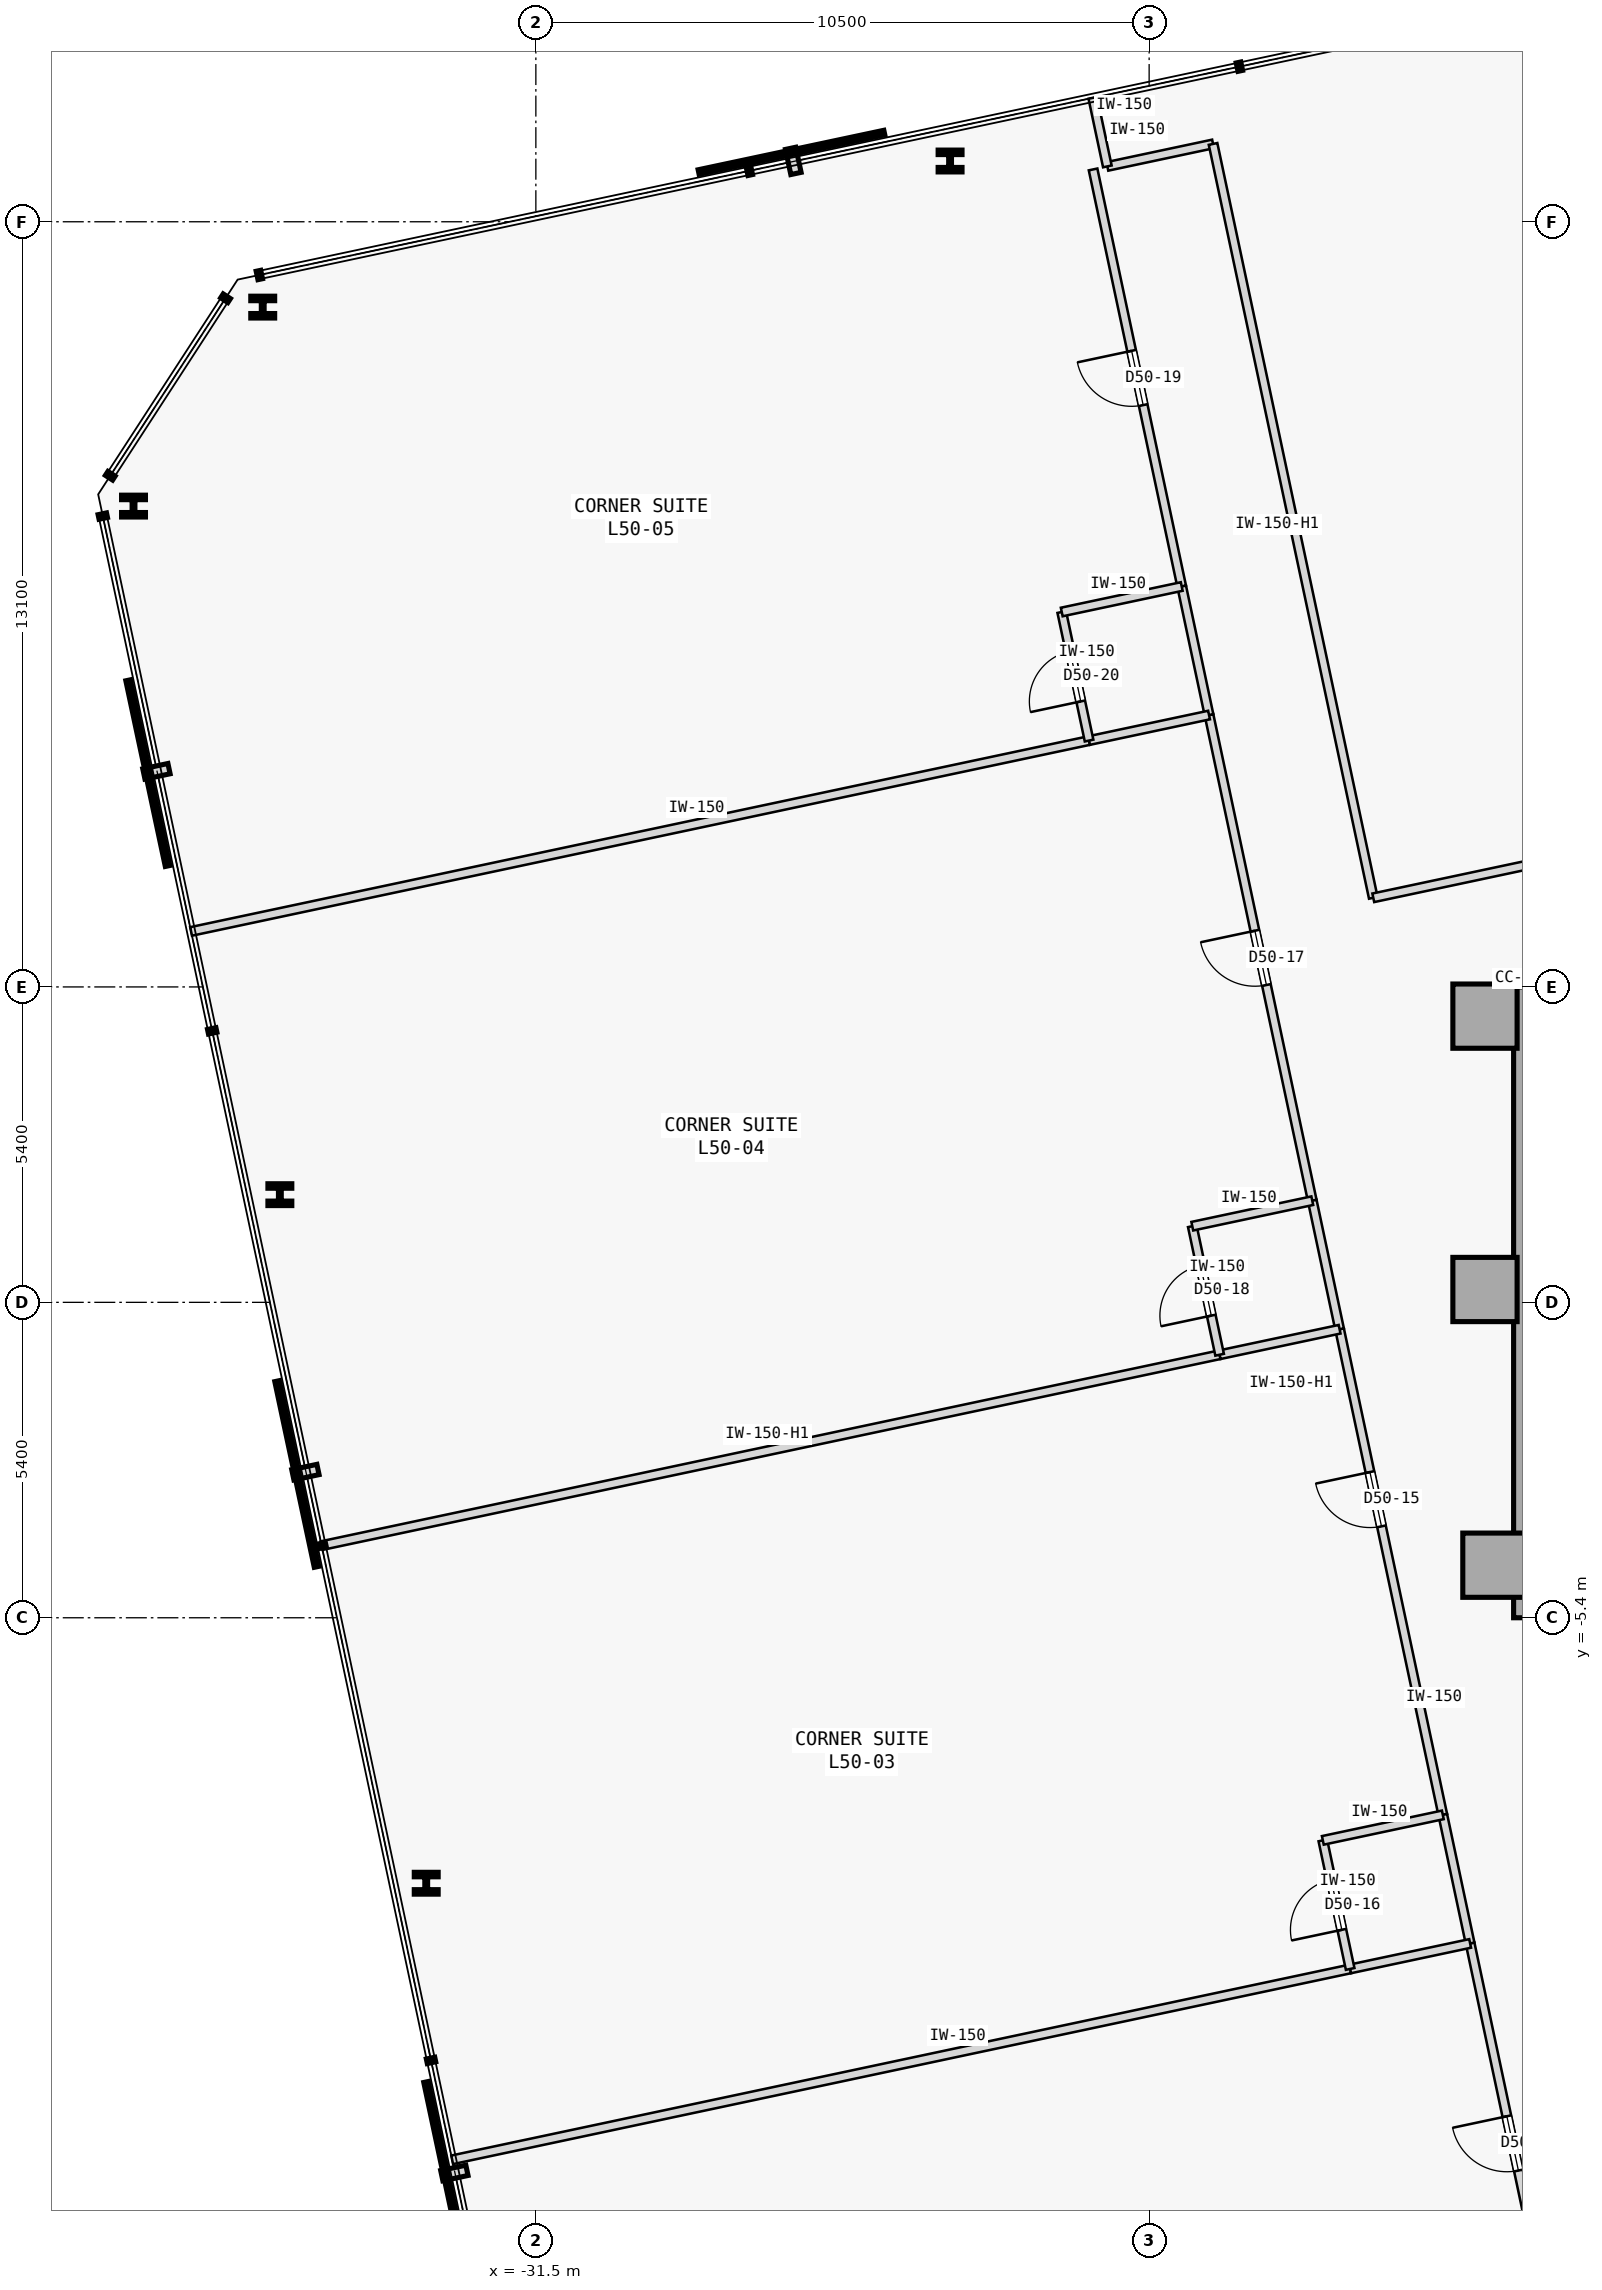
"""IFC4 building model, lengths in metres.
Left out: names, types, materials, properties, quantities, classifications, styles, units other than length and angle.
Written with IfcOpenShell. Run it as: python <this file> out.ifc"""

import sys

from ifc_helpers import new_model, si_unit, direction, frame, frame_2d, origin, origin_2d, place, context, subcontext, project, spatial, rectangle, i_section, extrude, element, fill, save


model = new_model("IFC4")
c1 = context("Model", 3, precision=1e-05, world=origin(), true_north=direction((0.0, 1.0)))
c2 = subcontext(c1, "Body", "Model", "MODEL_VIEW")
j1 = project(units=[si_unit("LENGTHUNIT", "METRE"), si_unit("PLANEANGLEUNIT", "RADIAN")], contexts=[c1])
p1 = place(None, origin())
s1 = spatial("IfcSite", under=j1, at=p1, CompositionType="ELEMENT")
p2 = place(p1, origin())
s2 = spatial("IfcBuilding", under=s1, at=p2, CompositionType="ELEMENT")
p3 = place(p2, frame((0.0, 0.0, 192.2)))
s3 = spatial("IfcBuildingStorey", under=s2, at=p3, CompositionType="ELEMENT", Elevation=192.2)
for number, where, z_axis, x_axis in (
    (1, (-15.25, 4.9, 0.0), (0.0, 0.0, 1.0), (1.0, 0.0, 0.0)),
    (2, (-15.25, 0.22, 0.0), (0.0, 0.0, 1.0), (1.0, 0.0, 0.0)),
    (3, (-15.08, -4.5, 0.0), (0.0, 0.0, 1.0), (1.0, 0.0, 0.0)),
):
    element("IfcColumn", number, at=place(p3, frame(where, z_axis=z_axis, x_axis=x_axis)), inside=s3, PredefinedType="COLUMN", context=c2, shape_type="SweptSolid", body=[
        extrude(rectangle(XDim=1.1, YDim=1.1, at=origin_2d()), origin(), (0.0, 0.0, 1.0), 3.4),
    ])
p4 = place(p3, frame((-14.56, -5.4, 0.0), z_axis=(0.0, 0.0, 1.0), x_axis=(0.0, 1.0, 0.0)))
e4 = element("IfcWall", 4, at=p4, inside=s3, PredefinedType="SHEAR", context=c2, shape_type="SweptSolid", body=[
    extrude(rectangle(XDim=10.8, YDim=0.4, at=frame_2d((5.4, 0.0))), origin(), (0.0, 0.0, 1.0), 3.175),
])
for number, where, z_axis, x_axis in (
    (5, (-24.408, 19.54, 0.0), (0.0, 0.0, 1.0), (1.0, 0.0, 0.0)),
    (6, (-36.176, 17.039, 0.0), (0.0, 0.0, 1.0), (1.0, 0.0, 0.0)),
    (7, (-38.389, 13.632, 0.0), (0.0, 0.0, 1.0), (1.0, 0.0, 0.0)),
    (8, (-35.883, 1.844, 0.0), (0.0, 0.0, 1.0), (1.0, 0.0, 0.0)),
    (9, (-33.377, -9.945, 0.0), (0.0, 0.0, 1.0), (1.0, 0.0, 0.0)),
):
    element("IfcColumn", number, at=place(p3, frame(where, z_axis=z_axis, x_axis=x_axis)), inside=s3, PredefinedType="COLUMN", context=c2, shape_type="SweptSolid", body=[
        extrude(i_section(OverallWidth=0.409, OverallDepth=0.374, WebThickness=0.048, FlangeThickness=0.077, FilletRadius=0.015, at=origin_2d()), origin(), (0.0, 0.0, 1.0), 3.4),
    ])
p5 = place(p3, frame((-21.715, 19.448, 0.0), z_axis=(0.0, 0.0, 1.0), x_axis=(0.978160192495, 0.207852442415, 0.0)))
e10 = element("IfcWall", 10, at=p5, inside=s3, PredefinedType="PARTITIONING", context=c2, shape_type="SweptSolid", body=[
    extrude(rectangle(XDim=1.85, YDim=0.15, at=frame_2d((0.925, 0.0))), origin(), (0.0, 0.0, 1.0), 3.175),
])
p6 = place(p3, frame((-17.162, 6.926, 0.0), z_axis=(0.0, 0.0, 1.0), x_axis=(-0.207911421929, 0.978147657888, 0.0)))
e11 = element("IfcWall", 11, at=p6, inside=s3, PredefinedType="PARTITIONING", context=c2, shape_type="SweptSolid", body=[
    extrude(rectangle(XDim=13.195, YDim=0.15, at=frame_2d((6.598, 0.0))), origin(), (0.0, 0.0, 1.0), 2.725),
])
p7 = place(p3, frame((-17.162, 6.926, 0.0), z_axis=(0.0, 0.0, 1.0), x_axis=(0.978145870853, 0.207919829103, 0.0)))
e12 = element("IfcWall", 12, at=p7, inside=s3, PredefinedType="PARTITIONING", context=c2, shape_type="SweptSolid", body=[
    extrude(rectangle(XDim=15.347, YDim=0.15, at=frame_2d((7.673, 0.0))), origin(), (0.0, 0.0, 1.0), 3.175),
])
p8 = place(p7, frame((7.213, 0.0, 0.0)))
e13 = element("IfcOpeningElement", 13, at=p8, cuts=e12, PredefinedType="OPENING", context=c2, shape_type="SweptSolid", body=[
    extrude(rectangle(XDim=0.92, YDim=2.15, at=frame_2d((0.46, 1.075))), frame((0.0, 0.085, 0.0), z_axis=(0.0, -1.0, 0.0), x_axis=(1.0, 0.0, 0.0)), (0.0, 0.0, 1.0), 0.17),
])
p9 = place(p3, frame((-14.049, -17.823, 0.0), z_axis=(0.0, 0.0, 1.0), x_axis=(-0.207940096132, 0.978141562567, 0.0)))
e14 = element("IfcWall", 14, at=p9, inside=s3, PredefinedType="PARTITIONING", context=c2, shape_type="SweptSolid", body=[
    extrude(rectangle(XDim=7.0, YDim=0.15, at=frame_2d((3.5, 0.0))), origin(), (0.0, 0.0, 1.0), 3.175),
])
p10 = place(p9, frame((3.025, 0.0, 0.0)))
e15 = element("IfcOpeningElement", 15, at=p10, cuts=e14, PredefinedType="OPENING", context=c2, shape_type="SweptSolid", body=[
    extrude(rectangle(XDim=0.95, YDim=2.15, at=frame_2d((0.475, 1.075))), frame((0.0, 0.085, 0.0), z_axis=(0.0, -1.0, 0.0), x_axis=(1.0, 0.0, 0.0)), (0.0, 0.0, 1.0), 0.17),
])
p11 = place(p3, frame((-15.972, -8.775, 0.0), z_axis=(0.0, 0.0, 1.0), x_axis=(-0.207894825434, 0.97815118543, 0.0)))
e16 = element("IfcWall", 16, at=p11, inside=s3, PredefinedType="PARTITIONING", context=c2, shape_type="SweptSolid", body=[
    extrude(rectangle(XDim=8.5, YDim=0.15, at=frame_2d((4.25, 0.0))), origin(), (0.0, 0.0, 1.0), 3.175),
])
p12 = place(p11, frame((5.05, 0.0, 0.0)))
e17 = element("IfcOpeningElement", 17, at=p12, cuts=e16, PredefinedType="OPENING", context=c2, shape_type="SweptSolid", body=[
    extrude(rectangle(XDim=0.95, YDim=2.15, at=frame_2d((0.475, 1.075))), frame((0.0, 0.085, 0.0), z_axis=(0.0, -1.0, 0.0), x_axis=(1.0, 0.0, 0.0)), (0.0, 0.0, 1.0), 0.17),
])
p13 = place(p3, frame((-15.504, -10.976, 0.0), z_axis=(0.0, 0.0, 1.0), x_axis=(-0.207891197838, 0.978151956427, 0.0)))
e18 = element("IfcWall", 18, at=p13, inside=s3, PredefinedType="PARTITIONING", context=c2, shape_type="SweptSolid", body=[
    extrude(rectangle(XDim=2.25, YDim=0.15, at=frame_2d((1.125, 0.0))), origin(), (0.0, 0.0, 1.0), 3.175),
])
p14 = place(p3, frame((-18.207, 1.74, 0.0), z_axis=(0.0, 0.0, 1.0), x_axis=(-0.207922306475, 0.978145344246, 0.0)))
e19 = element("IfcWall", 19, at=p14, inside=s3, PredefinedType="PARTITIONING", context=c2, shape_type="SweptSolid", body=[
    extrude(rectangle(XDim=8.5, YDim=0.15, at=frame_2d((4.25, 0.0))), origin(), (0.0, 0.0, 1.0), 3.175),
])
p15 = place(p14, frame((3.775, 0.0, 0.0)))
e20 = element("IfcOpeningElement", 20, at=p15, cuts=e19, PredefinedType="OPENING", context=c2, shape_type="SweptSolid", body=[
    extrude(rectangle(XDim=0.95, YDim=2.15, at=frame_2d((0.475, 1.075))), frame((0.0, 0.085, 0.0), z_axis=(0.0, -1.0, 0.0), x_axis=(1.0, 0.0, 0.0)), (0.0, 0.0, 1.0), 0.17),
])
p16 = place(p3, frame((-17.739, -0.46, 0.0), z_axis=(0.0, 0.0, 1.0), x_axis=(-0.207891197838, 0.978151956427, 0.0)))
e21 = element("IfcWall", 21, at=p16, inside=s3, PredefinedType="PARTITIONING", context=c2, shape_type="SweptSolid", body=[
    extrude(rectangle(XDim=2.25, YDim=0.15, at=frame_2d((1.125, 0.0))), origin(), (0.0, 0.0, 1.0), 3.175),
])
p17 = place(p3, frame((-20.442, 12.255, 0.0), z_axis=(0.0, 0.0, 1.0), x_axis=(-0.207916352354, 0.978146609882, 0.0)))
e22 = element("IfcWall", 22, at=p17, inside=s3, PredefinedType="PARTITIONING", context=c2, shape_type="SweptSolid", body=[
    extrude(rectangle(XDim=7.3, YDim=0.15, at=frame_2d((3.65, 0.0))), origin(), (0.0, 0.0, 1.0), 3.175),
])
p18 = place(p17, frame((3.175, 0.0, 0.0)))
e23 = element("IfcOpeningElement", 23, at=p18, cuts=e22, PredefinedType="OPENING", context=c2, shape_type="SweptSolid", body=[
    extrude(rectangle(XDim=0.95, YDim=2.15, at=frame_2d((0.475, 1.075))), frame((0.0, 0.085, 0.0), z_axis=(0.0, -1.0, 0.0), x_axis=(1.0, 0.0, 0.0)), (0.0, 0.0, 1.0), 0.17),
])
p19 = place(p3, frame((-19.974, 10.055, 0.0), z_axis=(0.0, 0.0, 1.0), x_axis=(-0.207913264065, 0.978147266328, 0.0)))
e24 = element("IfcWall", 24, at=p19, inside=s3, PredefinedType="PARTITIONING", context=c2, shape_type="SweptSolid", body=[
    extrude(rectangle(XDim=2.25, YDim=0.15, at=frame_2d((1.125, 0.0))), origin(), (0.0, 0.0, 1.0), 3.175),
])
p20 = place(p3, frame((-21.715, 19.448, 0.0), z_axis=(0.0, 0.0, 1.0), x_axis=(-0.20795853359, 0.978137642823, 0.0)))
e25 = element("IfcWall", 25, at=p20, inside=s3, PredefinedType="PARTITIONING", context=c2, shape_type="SweptSolid", body=[
    extrude(rectangle(XDim=1.2, YDim=0.15, at=frame_2d((0.6, 0.0))), origin(), (0.0, 0.0, 1.0), 3.175),
])
p21 = place(p3, frame((-32.933, -14.68, 0.0), z_axis=(0.0, 0.0, 1.0), x_axis=(0.978146137903, 0.207918572776, 0.0)))
e26 = element("IfcWall", 26, at=p21, inside=s3, PredefinedType="PARTITIONING", context=c2, shape_type="SweptSolid", body=[
    extrude(rectangle(XDim=15.718, YDim=0.15, at=frame_2d((7.859, 0.0))), origin(), (0.0, 0.0, 1.0), 3.175),
])
p22 = place(p3, frame((-17.558, -11.412, 0.0), z_axis=(0.0, 0.0, 1.0), x_axis=(0.978153236239, 0.207885176084, 0.0)))
e27 = element("IfcWall", 27, at=p22, inside=s3, PredefinedType="PARTITIONING", context=c2, shape_type="SweptSolid", body=[
    extrude(rectangle(XDim=2.1, YDim=0.15, at=frame_2d((1.05, 0.0))), origin(), (0.0, 0.0, 1.0), 3.175),
])
p23 = place(p3, frame((-17.558, -11.412, 0.0), z_axis=(0.0, 0.0, 1.0), x_axis=(-0.207891197838, 0.978151956427, 0.0)))
e28 = element("IfcWall", 28, at=p23, inside=s3, PredefinedType="PARTITIONING", context=c2, shape_type="SweptSolid", body=[
    extrude(rectangle(XDim=2.25, YDim=0.15, at=frame_2d((1.125, 0.0))), origin(), (0.0, 0.0, 1.0), 3.175),
])
p24 = place(p23, frame((0.685, 0.0, 0.0)))
e29 = element("IfcOpeningElement", 29, at=p24, cuts=e28, PredefinedType="OPENING", context=c2, shape_type="SweptSolid", body=[
    extrude(rectangle(XDim=0.88, YDim=2.15, at=frame_2d((0.44, 1.075))), frame((0.0, 0.085, 0.0), z_axis=(0.0, -1.0, 0.0), x_axis=(1.0, 0.0, 0.0)), (0.0, 0.0, 1.0), 0.17),
])
p25 = place(p3, frame((-18.026, -9.211, 0.0), z_axis=(0.0, 0.0, 1.0), x_axis=(0.978153236239, 0.207885176084, 0.0)))
e30 = element("IfcWall", 30, at=p25, inside=s3, PredefinedType="PARTITIONING", context=c2, shape_type="SweptSolid", body=[
    extrude(rectangle(XDim=2.1, YDim=0.15, at=frame_2d((1.05, 0.0))), origin(), (0.0, 0.0, 1.0), 3.175),
])
p26 = place(p3, frame((-35.168, -4.165, 0.0), z_axis=(0.0, 0.0, 1.0), x_axis=(0.978149296727, 0.207903711638, 0.0)))
e31 = element("IfcWall", 31, at=p26, inside=s3, PredefinedType="PARTITIONING", context=c2, shape_type="SweptSolid", body=[
    extrude(rectangle(XDim=15.718, YDim=0.15, at=frame_2d((7.859, 0.0))), origin(), (0.0, 0.0, 1.0), 2.725),
])
p27 = place(p3, frame((-19.793, -0.897, 0.0), z_axis=(0.0, 0.0, 1.0), x_axis=(0.978134617382, 0.207972763311, 0.0)))
e32 = element("IfcWall", 32, at=p27, inside=s3, PredefinedType="PARTITIONING", context=c2, shape_type="SweptSolid", body=[
    extrude(rectangle(XDim=2.1, YDim=0.15, at=frame_2d((1.05, 0.0))), origin(), (0.0, 0.0, 1.0), 2.725),
])
p28 = place(p3, frame((-19.793, -0.897, 0.0), z_axis=(0.0, 0.0, 1.0), x_axis=(-0.207891197838, 0.978151956427, 0.0)))
e33 = element("IfcWall", 33, at=p28, inside=s3, PredefinedType="PARTITIONING", context=c2, shape_type="SweptSolid", body=[
    extrude(rectangle(XDim=2.25, YDim=0.15, at=frame_2d((1.125, 0.0))), origin(), (0.0, 0.0, 1.0), 3.175),
])
p29 = place(p28, frame((0.685, 0.0, 0.0)))
e34 = element("IfcOpeningElement", 34, at=p29, cuts=e33, PredefinedType="OPENING", context=c2, shape_type="SweptSolid", body=[
    extrude(rectangle(XDim=0.88, YDim=2.15, at=frame_2d((0.44, 1.075))), frame((0.0, 0.085, 0.0), z_axis=(0.0, -1.0, 0.0), x_axis=(1.0, 0.0, 0.0)), (0.0, 0.0, 1.0), 0.17),
])
p30 = place(p3, frame((-20.261, 1.304, 0.0), z_axis=(0.0, 0.0, 1.0), x_axis=(0.978134617382, 0.207972763311, 0.0)))
e35 = element("IfcWall", 35, at=p30, inside=s3, PredefinedType="PARTITIONING", context=c2, shape_type="SweptSolid", body=[
    extrude(rectangle(XDim=2.1, YDim=0.15, at=frame_2d((1.05, 0.0))), origin(), (0.0, 0.0, 1.0), 3.175),
])
p31 = place(p3, frame((-37.403, 6.35, 0.0), z_axis=(0.0, 0.0, 1.0), x_axis=(0.978149296727, 0.207903711638, 0.0)))
e36 = element("IfcWall", 36, at=p31, inside=s3, PredefinedType="PARTITIONING", context=c2, shape_type="SweptSolid", body=[
    extrude(rectangle(XDim=15.718, YDim=0.15, at=frame_2d((7.859, 0.0))), origin(), (0.0, 0.0, 1.0), 3.175),
])
p32 = place(p3, frame((-22.029, 9.618, 0.0), z_axis=(0.0, 0.0, 1.0), x_axis=(0.978134617382, 0.207972763311, 0.0)))
e37 = element("IfcWall", 37, at=p32, inside=s3, PredefinedType="PARTITIONING", context=c2, shape_type="SweptSolid", body=[
    extrude(rectangle(XDim=2.1, YDim=0.15, at=frame_2d((1.05, 0.0))), origin(), (0.0, 0.0, 1.0), 3.175),
])
p33 = place(p3, frame((-22.029, 9.618, 0.0), z_axis=(0.0, 0.0, 1.0), x_axis=(-0.207891197838, 0.978151956427, 0.0)))
e38 = element("IfcWall", 38, at=p33, inside=s3, PredefinedType="PARTITIONING", context=c2, shape_type="SweptSolid", body=[
    extrude(rectangle(XDim=2.25, YDim=0.15, at=frame_2d((1.125, 0.0))), origin(), (0.0, 0.0, 1.0), 3.175),
])
p34 = place(p33, frame((0.685, 0.0, 0.0)))
e39 = element("IfcOpeningElement", 39, at=p34, cuts=e38, PredefinedType="OPENING", context=c2, shape_type="SweptSolid", body=[
    extrude(rectangle(XDim=0.88, YDim=2.15, at=frame_2d((0.44, 1.075))), frame((0.0, 0.085, 0.0), z_axis=(0.0, -1.0, 0.0), x_axis=(1.0, 0.0, 0.0)), (0.0, 0.0, 1.0), 0.17),
])
p35 = place(p3, frame((-22.496, 11.819, 0.0), z_axis=(0.0, 0.0, 1.0), x_axis=(0.97815826, 0.207861536591, 0.0)))
e40 = element("IfcWall", 40, at=p35, inside=s3, PredefinedType="PARTITIONING", context=c2, shape_type="SweptSolid", body=[
    extrude(rectangle(XDim=2.1, YDim=0.15, at=frame_2d((1.05, 0.0))), origin(), (0.0, 0.0, 1.0), 3.175),
])
p36 = place(p10, origin())
e41 = element("IfcDoor", 41, at=p36, inside=s3, OperationType="SINGLE_SWING_RIGHT", PredefinedType="DOOR", context=c2, shape_type="SweptSolid", body=[
    extrude(rectangle(XDim=0.95, YDim=2.15, at=frame_2d((0.475, 1.075))), frame((0.0, 0.025, 0.0), z_axis=(0.0, -1.0, 0.0), x_axis=(1.0, 0.0, 0.0)), (0.0, 0.0, 1.0), 0.05),
])
fill(e15, e41)
p37 = place(p12, origin())
e42 = element("IfcDoor", 42, at=p37, inside=s3, OperationType="SINGLE_SWING_RIGHT", PredefinedType="DOOR", context=c2, shape_type="SweptSolid", body=[
    extrude(rectangle(XDim=0.95, YDim=2.15, at=frame_2d((0.475, 1.075))), frame((0.0, 0.025, 0.0), z_axis=(0.0, -1.0, 0.0), x_axis=(1.0, 0.0, 0.0)), (0.0, 0.0, 1.0), 0.05),
])
fill(e17, e42)
p38 = place(p24, origin())
e43 = element("IfcDoor", 43, at=p38, inside=s3, OperationType="SINGLE_SWING_LEFT", PredefinedType="DOOR", context=c2, shape_type="SweptSolid", body=[
    extrude(rectangle(XDim=0.88, YDim=2.15, at=frame_2d((0.44, 1.075))), frame((0.0, 0.025, 0.0), z_axis=(0.0, -1.0, 0.0), x_axis=(1.0, 0.0, 0.0)), (0.0, 0.0, 1.0), 0.05),
])
fill(e29, e43)
p39 = place(p15, origin())
e44 = element("IfcDoor", 44, at=p39, inside=s3, OperationType="SINGLE_SWING_RIGHT", PredefinedType="DOOR", context=c2, shape_type="SweptSolid", body=[
    extrude(rectangle(XDim=0.95, YDim=2.15, at=frame_2d((0.475, 1.075))), frame((0.0, 0.025, 0.0), z_axis=(0.0, -1.0, 0.0), x_axis=(1.0, 0.0, 0.0)), (0.0, 0.0, 1.0), 0.05),
])
fill(e20, e44)
p40 = place(p29, origin())
e45 = element("IfcDoor", 45, at=p40, inside=s3, OperationType="SINGLE_SWING_LEFT", PredefinedType="DOOR", context=c2, shape_type="SweptSolid", body=[
    extrude(rectangle(XDim=0.88, YDim=2.15, at=frame_2d((0.44, 1.075))), frame((0.0, 0.025, 0.0), z_axis=(0.0, -1.0, 0.0), x_axis=(1.0, 0.0, 0.0)), (0.0, 0.0, 1.0), 0.05),
])
fill(e34, e45)
p41 = place(p18, origin())
e46 = element("IfcDoor", 46, at=p41, inside=s3, OperationType="SINGLE_SWING_RIGHT", PredefinedType="DOOR", context=c2, shape_type="SweptSolid", body=[
    extrude(rectangle(XDim=0.95, YDim=2.15, at=frame_2d((0.475, 1.075))), frame((0.0, 0.025, 0.0), z_axis=(0.0, -1.0, 0.0), x_axis=(1.0, 0.0, 0.0)), (0.0, 0.0, 1.0), 0.05),
])
fill(e23, e46)
p42 = place(p34, origin())
e47 = element("IfcDoor", 47, at=p42, inside=s3, OperationType="SINGLE_SWING_LEFT", PredefinedType="DOOR", context=c2, shape_type="SweptSolid", body=[
    extrude(rectangle(XDim=0.88, YDim=2.15, at=frame_2d((0.44, 1.075))), frame((0.0, 0.025, 0.0), z_axis=(0.0, -1.0, 0.0), x_axis=(1.0, 0.0, 0.0)), (0.0, 0.0, 1.0), 0.05),
])
fill(e39, e47)
save(model, sys.argv[1])
